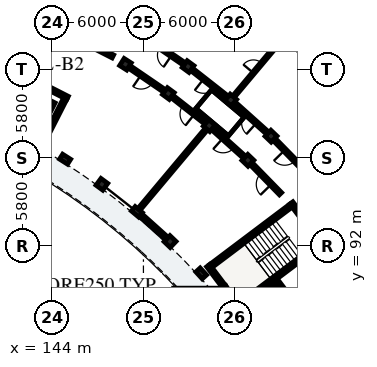
"""IFC4 building model, lengths in metres.
Left out: names, types, materials, properties, quantities, classifications, styles, units other than length and angle.
Written with IfcOpenShell. Run it as: python <this file> out.ifc"""

import sys

from ifc_helpers import new_model, si_unit, direction, frame, frame_2d, origin, origin_2d, place, context, subcontext, project, spatial, rectangle, extrude, element, fill, save


model = new_model("IFC4")
c1 = context("Model", 3, precision=1e-05, world=origin(), true_north=direction((0.0, 1.0)))
c2 = subcontext(c1, "Body", "Model", "MODEL_VIEW")
j1 = project(units=[si_unit("LENGTHUNIT", "METRE"), si_unit("PLANEANGLEUNIT", "RADIAN")], contexts=[c1])
p1 = place(None, origin())
s1 = spatial("IfcSite", under=j1, at=p1, CompositionType="ELEMENT")
p2 = place(p1, origin())
s2 = spatial("IfcBuilding", under=s1, at=p2, CompositionType="ELEMENT")
p3 = place(p2, frame((0.0, 0.0, 15.56)))
s3 = spatial("IfcBuildingStorey", under=s2, at=p3, CompositionType="ELEMENT", Elevation=15.56)
p4 = place(p3, frame((159.707, 94.658, 0.0), z_axis=(0.0, 0.0, 1.0), x_axis=(-0.798639633744, -0.601809550782, 0.0)))
e1 = element("IfcWall", 1, at=p4, inside=s3, PredefinedType="SHEAR", context=c2, shape_type="SweptSolid", body=[
    extrude(rectangle(XDim=6.6, YDim=0.25, at=frame_2d((3.3, 0.0))), origin(), (0.0, 0.0, 1.0), 3.11),
])
p5 = place(p3, frame((154.261, 90.711, 0.0), z_axis=(0.0, 0.0, 1.0), x_axis=(0.601825826579, -0.798627368967, 0.0)))
e2 = element("IfcWall", 2, at=p5, inside=s3, PredefinedType="SHEAR", context=c2, shape_type="SweptSolid", body=[
    extrude(rectangle(XDim=3.42, YDim=0.25, at=frame_2d((1.71, 0.0))), origin(), (0.0, 0.0, 1.0), 3.11),
])
p6 = place(p3, frame((159.731, 94.833, 0.0), z_axis=(0.0, 0.0, 1.0), x_axis=(0.601814606132, -0.798635824294, 0.0)))
e3 = element("IfcWall", 3, at=p6, inside=s3, PredefinedType="SHEAR", context=c2, shape_type="SweptSolid", body=[
    extrude(rectangle(XDim=3.42, YDim=0.25, at=frame_2d((1.71, 0.0))), origin(), (0.0, 0.0, 1.0), 3.11),
])
p7 = place(p3, frame((161.615, 92.126, 0.0), z_axis=(0.0, 0.0, 1.0), x_axis=(-0.798639633744, -0.601809550782, 0.0)))
e4 = element("IfcWall", 4, at=p7, inside=s3, PredefinedType="SHEAR", context=c2, shape_type="SweptSolid", body=[
    extrude(rectangle(XDim=6.6, YDim=0.25, at=frame_2d((3.3, 0.0))), origin(), (0.0, 0.0, 1.0), 3.11),
])
p8 = place(p7, frame((0.22, 0.0, 0.0)))
e5 = element("IfcOpeningElement", 5, at=p8, cuts=e4, PredefinedType="OPENING", context=c2, shape_type="SweptSolid", body=[
    extrude(rectangle(XDim=1.05, YDim=2.15, at=frame_2d((0.525, 1.075))), frame((0.0, 0.135, 0.0), z_axis=(0.0, -1.0, 0.0), x_axis=(1.0, 0.0, 0.0)), (0.0, 0.0, 1.0), 0.27),
])
p9 = place(p3, frame((158.827, 89.619, 0.0), z_axis=(0.0, 0.0, 1.0), x_axis=(0.601819781152, -0.798631924615, 0.0)))
e6 = element("IfcWall", 6, at=p9, inside=s3, PredefinedType="SHEAR", context=c2, shape_type="SweptSolid", body=[
    extrude(rectangle(XDim=3.26, YDim=0.23, at=frame_2d((1.63, 0.0))), origin(), (0.0, 0.0, 1.0), 3.11),
])
p10 = place(p9, frame((0.9, 0.0, 0.0)))
e7 = element("IfcOpeningElement", 7, at=p10, cuts=e6, PredefinedType="OPENING", context=c2, shape_type="SweptSolid", body=[
    extrude(rectangle(XDim=1.1, YDim=2.15, at=frame_2d((0.55, 1.075))), frame((0.0, 0.125, 0.0), z_axis=(0.0, -1.0, 0.0), x_axis=(1.0, 0.0, 0.0)), (0.0, 0.0, 1.0), 0.25),
])
p11 = place(p3, frame((158.805, 89.458, 0.0), z_axis=(0.0, 0.0, 1.0), x_axis=(-0.798608971494, -0.601850239387, 0.0)))
e8 = element("IfcWall", 8, at=p11, inside=s3, PredefinedType="SHEAR", context=c2, shape_type="SweptSolid", body=[
    extrude(rectangle(XDim=2.7, YDim=0.23, at=frame_2d((1.35, 0.0))), origin(), (0.0, 0.0, 1.0), 3.11),
])
p12 = place(p3, frame((142.103, 103.224, 0.0), z_axis=(0.0, 0.0, 1.0), x_axis=(0.891001200497, -0.454000947921, 0.0)))
e9 = element("IfcWall", 9, at=p12, inside=s3, PredefinedType="SHEAR", context=c2, shape_type="SweptSolid", body=[
    extrude(rectangle(XDim=3.26, YDim=0.23, at=frame_2d((1.63, 0.0))), origin(), (0.0, 0.0, 1.0), 3.11),
])
p13 = place(p12, frame((0.9, 0.0, 0.0)))
e10 = element("IfcOpeningElement", 10, at=p13, cuts=e9, PredefinedType="OPENING", context=c2, shape_type="SweptSolid", body=[
    extrude(rectangle(XDim=1.0, YDim=2.15, at=frame_2d((0.5, 1.075))), frame((0.0, 0.125, 0.0), z_axis=(0.0, -1.0, 0.0), x_axis=(1.0, 0.0, 0.0)), (0.0, 0.0, 1.0), 0.25),
])
p14 = place(p3, frame((144.853, 101.694, 0.0), z_axis=(0.0, 0.0, 1.0), x_axis=(-0.454036857101, -0.890982902414, 0.0)))
e11 = element("IfcWall", 11, at=p14, inside=s3, PredefinedType="SHEAR", context=c2, shape_type="SweptSolid", body=[
    extrude(rectangle(XDim=2.7, YDim=0.23, at=frame_2d((1.35, 0.0))), origin(), (0.0, 0.0, 1.0), 3.11),
])
p15 = place(p3, frame((153.801, 90.198, 0.0), z_axis=(0.0, 0.0, 1.0), x_axis=(0.73793204255, 0.674875025896, 0.0)))
e12 = element("IfcColumn", 12, at=p15, inside=s3, PredefinedType="PILASTER", context=c2, shape_type="SweptSolid", body=[
    extrude(rectangle(XDim=0.38, YDim=0.62, at=origin_2d()), origin(), (0.0, 0.0, 1.0), 3.11),
])
for number, where, z_axis, x_axis in (
    (13, (151.753, 92.294, 0.0), (0.0, 0.0, 1.0), (0.692, 0.722, 0.0)),
    (14, (156.873, 97.637, 0.0), (0.0, 0.0, 1.0), (0.692, 0.722, 0.0)),
    (15, (158.395, 99.226, 0.0), (0.0, 0.0, 1.0), (0.692, 0.722, 0.0)),
):
    element("IfcColumn", number, at=place(p3, frame(where, z_axis=z_axis, x_axis=x_axis)), inside=s3, PredefinedType="COLUMN", context=c2, shape_type="SweptSolid", body=[
        extrude(rectangle(XDim=0.55, YDim=0.55, at=origin_2d()), origin(), (0.0, 0.0, 1.0), 3.11),
    ])
p16 = place(p3, frame((149.572, 94.251, 0.0), z_axis=(0.0, 0.0, 1.0), x_axis=(0.642787582947, 0.766044465556, 0.0)))
e16 = element("IfcColumn", 16, at=p16, inside=s3, PredefinedType="PILASTER", context=c2, shape_type="SweptSolid", body=[
    extrude(rectangle(XDim=0.38, YDim=0.62, at=origin_2d()), origin(), (0.0, 0.0, 1.0), 3.11),
])
for number, where, z_axis, x_axis in (
    (17, (154.329, 99.919, 0.0), (0.0, 0.0, 1.0), (0.643, 0.766, 0.0)),
    (18, (155.743, 101.605, 0.0), (0.0, 0.0, 1.0), (0.643, 0.766, 0.0)),
    (19, (147.266, 96.059, 0.0), (0.0, 0.0, 1.0), (0.591, 0.807, 0.0)),
    (20, (151.639, 102.029, 0.0), (0.0, 0.0, 1.0), (0.591, 0.807, 0.0)),
    (21, (152.939, 103.804, 0.0), (0.0, 0.0, 1.0), (0.591, 0.807, 0.0)),
):
    element("IfcColumn", number, at=place(p3, frame(where, z_axis=z_axis, x_axis=x_axis)), inside=s3, PredefinedType="COLUMN", context=c2, shape_type="SweptSolid", body=[
        extrude(rectangle(XDim=0.55, YDim=0.55, at=origin_2d()), origin(), (0.0, 0.0, 1.0), 3.11),
    ])
p17 = place(p3, frame((144.847, 97.712, 0.0), z_axis=(0.0, 0.0, 1.0), x_axis=(0.536481544469, 0.843912052553, 0.0)))
e22 = element("IfcColumn", 22, at=p17, inside=s3, PredefinedType="PILASTER", context=c2, shape_type="SweptSolid", body=[
    extrude(rectangle(XDim=0.38, YDim=0.62, at=origin_2d()), origin(), (0.0, 0.0, 1.0), 3.11),
])
p18 = place(p3, frame((148.817, 103.957, 0.0), z_axis=(0.0, 0.0, 1.0), x_axis=(0.536481544469, 0.843912052553, 0.0)))
e23 = element("IfcColumn", 23, at=p18, inside=s3, PredefinedType="COLUMN", context=c2, shape_type="SweptSolid", body=[
    extrude(rectangle(XDim=0.55, YDim=0.55, at=origin_2d()), origin(), (0.0, 0.0, 1.0), 3.11),
])
p19 = place(p3, frame((162.018, 103.36, 0.0), z_axis=(0.0, 0.0, 1.0), x_axis=(-0.744413726571, 0.667718656092, 0.0)))
e24 = element("IfcWall", 24, at=p19, inside=s3, PredefinedType="SOLIDWALL", context=c2, shape_type="SweptSolid", body=[
    extrude(rectangle(XDim=3.521, YDim=0.24, at=frame_2d((1.76, 0.0))), origin(), (0.0, 0.0, 1.0), 2.355),
])
p20 = place(p19, frame((0.92, 0.0, 0.55)))
e25 = element("IfcOpeningElement", 25, at=p20, cuts=e24, PredefinedType="OPENING", context=c2, shape_type="SweptSolid", body=[
    extrude(rectangle(XDim=1.68, YDim=1.585, at=frame_2d((0.84, 0.792))), frame((0.0, 0.13, 0.0), z_axis=(0.0, -1.0, 0.0), x_axis=(1.0, 0.0, 0.0)), (0.0, 0.0, 1.0), 0.26),
])
p21 = place(p3, frame((151.571, 92.458, 0.0), z_axis=(0.0, 0.0, 1.0), x_axis=(-0.744489903584, 0.667633719536, 0.0)))
e26 = element("IfcWall", 26, at=p21, inside=s3, PredefinedType="SOLIDWALL", context=c2, shape_type="SweptSolid", body=[
    extrude(rectangle(XDim=2.525, YDim=0.24, at=frame_2d((1.263, 0.0))), origin(), (0.0, 0.0, 1.0), 2.355),
])
p22 = place(p21, frame((0.588, 0.0, 0.35)))
e27 = element("IfcOpeningElement", 27, at=p22, cuts=e26, PredefinedType="OPENING", context=c2, shape_type="SweptSolid", body=[
    extrude(rectangle(XDim=1.35, YDim=1.65, at=frame_2d((0.675, 0.825))), frame((0.0, 0.13, 0.0), z_axis=(0.0, -1.0, 0.0), x_axis=(1.0, 0.0, 0.0)), (0.0, 0.0, 1.0), 0.26),
])
p23 = place(p3, frame((143.625, 106.696, 0.0), z_axis=(0.0, 0.0, 1.0), x_axis=(0.891003372311, -0.453996685595, 0.0)))
e28 = element("IfcWall", 28, at=p23, inside=s3, PredefinedType="PARTITIONING", context=c2, shape_type="SweptSolid", body=[
    extrude(rectangle(XDim=4.9, YDim=0.22, at=frame_2d((2.45, 0.0))), origin(), (0.0, 0.0, 1.0), 2.34),
])
p24 = place(p23, frame((1.95, 0.0, 0.0)))
e29 = element("IfcOpeningElement", 29, at=p24, cuts=e28, PredefinedType="OPENING", context=c2, shape_type="SweptSolid", body=[
    extrude(rectangle(XDim=0.98, YDim=2.14, at=frame_2d((0.49, 1.07))), frame((0.0, 0.12, 0.0), z_axis=(0.0, -1.0, 0.0), x_axis=(1.0, 0.0, 0.0)), (0.0, 0.0, 1.0), 0.24),
])
p25 = place(p3, frame((160.641, 96.927, 0.0), z_axis=(0.0, 0.0, 1.0), x_axis=(-0.698787219683, 0.715329589496, 0.0)))
e30 = element("IfcWall", 30, at=p25, inside=s3, PredefinedType="PARTITIONING", context=c2, shape_type="SweptSolid", body=[
    extrude(rectangle(XDim=2.863, YDim=0.205, at=frame_2d((1.432, 0.0))), origin(), (0.0, 0.0, 1.0), 2.37),
])
p26 = place(p25, frame((0.937, 0.0, 0.0)))
e31 = element("IfcOpeningElement", 31, at=p26, cuts=e30, PredefinedType="OPENING", context=c2, shape_type="SweptSolid", body=[
    extrude(rectangle(XDim=0.99, YDim=2.16, at=frame_2d((0.495, 1.08))), frame((0.0, 0.113, 0.0), z_axis=(0.0, -1.0, 0.0), x_axis=(1.0, 0.0, 0.0)), (0.0, 0.0, 1.0), 0.225),
])
p27 = place(p3, frame((159.017, 95.443, 0.0), z_axis=(0.0, 0.0, 1.0), x_axis=(-0.698840007829, 0.715278018296, 0.0)))
e32 = element("IfcWall", 32, at=p27, inside=s3, PredefinedType="PARTITIONING", context=c2, shape_type="SweptSolid", body=[
    extrude(rectangle(XDim=2.718, YDim=0.205, at=frame_2d((1.359, 0.0))), origin(), (0.0, 0.0, 1.0), 2.37),
])
p28 = place(p27, frame((0.864, 0.0, 0.0)))
e33 = element("IfcOpeningElement", 33, at=p28, cuts=e32, PredefinedType="OPENING", context=c2, shape_type="SweptSolid", body=[
    extrude(rectangle(XDim=0.99, YDim=2.16, at=frame_2d((0.495, 1.08))), frame((0.0, 0.113, 0.0), z_axis=(0.0, -1.0, 0.0), x_axis=(1.0, 0.0, 0.0)), (0.0, 0.0, 1.0), 0.225),
])
p29 = place(p3, frame((158.135, 99.459, 0.0), z_axis=(0.0, 0.0, 1.0), x_axis=(-0.744433521088, 0.667696587291, 0.0)))
e34 = element("IfcWall", 34, at=p29, inside=s3, PredefinedType="PARTITIONING", context=c2, shape_type="SweptSolid", body=[
    extrude(rectangle(XDim=2.863, YDim=0.205, at=frame_2d((1.432, 0.0))), origin(), (0.0, 0.0, 1.0), 2.37),
])
p30 = place(p29, frame((0.947, 0.0, 0.0)))
e35 = element("IfcOpeningElement", 35, at=p30, cuts=e34, PredefinedType="OPENING", context=c2, shape_type="SweptSolid", body=[
    extrude(rectangle(XDim=0.97, YDim=2.15, at=frame_2d((0.485, 1.075))), frame((0.0, 0.113, 0.0), z_axis=(0.0, -1.0, 0.0), x_axis=(1.0, 0.0, 0.0)), (0.0, 0.0, 1.0), 0.225),
])
p31 = place(p3, frame((156.613, 97.871, 0.0), z_axis=(0.0, 0.0, 1.0), x_axis=(-0.744418559135, 0.667713268413, 0.0)))
e36 = element("IfcWall", 36, at=p31, inside=s3, PredefinedType="PARTITIONING", context=c2, shape_type="SweptSolid", body=[
    extrude(rectangle(XDim=2.718, YDim=0.205, at=frame_2d((1.359, 0.0))), origin(), (0.0, 0.0, 1.0), 2.37),
])
p32 = place(p31, frame((0.874, 0.0, 0.0)))
e37 = element("IfcOpeningElement", 37, at=p32, cuts=e36, PredefinedType="OPENING", context=c2, shape_type="SweptSolid", body=[
    extrude(rectangle(XDim=0.97, YDim=2.15, at=frame_2d((0.485, 1.075))), frame((0.0, 0.113, 0.0), z_axis=(0.0, -1.0, 0.0), x_axis=(1.0, 0.0, 0.0)), (0.0, 0.0, 1.0), 0.225),
])
p33 = place(p3, frame((156.0, 101.911, 0.0), z_axis=(0.0, 0.0, 1.0), x_axis=(0.642811926223, 0.766024038465, 0.0)))
e38 = element("IfcWall", 38, at=p33, inside=s3, PredefinedType="PLUMBINGWALL", context=c2, shape_type="SweptSolid", body=[
    extrude(rectangle(XDim=4.7, YDim=0.15, at=frame_2d((2.35, 0.0))), origin(), (0.0, 0.0, 1.0), 2.37),
])
p34 = place(p33, frame((1.92, 0.0, 0.0)))
e39 = element("IfcOpeningElement", 39, at=p34, cuts=e38, PredefinedType="OPENING", context=c2, shape_type="SweptSolid", body=[
    extrude(rectangle(XDim=0.86, YDim=2.06, at=frame_2d((0.43, 1.03))), frame((0.0, 0.085, 0.0), z_axis=(0.0, -1.0, 0.0), x_axis=(1.0, 0.0, 0.0)), (0.0, 0.0, 1.0), 0.17),
])
p35 = place(p3, frame((149.829, 94.557, 0.0), z_axis=(0.0, 0.0, 1.0), x_axis=(0.642789470807, 0.766042881449, 0.0)))
e40 = element("IfcWall", 40, at=p35, inside=s3, PredefinedType="PARTITIONING", context=c2, shape_type="SweptSolid", body=[
    extrude(rectangle(XDim=6.6, YDim=0.185, at=frame_2d((3.3, 0.0))), origin(), (0.0, 0.0, 1.0), 2.37),
])
p36 = place(p3, frame((155.467, 101.821, 0.0), z_axis=(0.0, 0.0, 1.0), x_axis=(-0.786806323554, 0.617199975061, 0.0)))
e41 = element("IfcWall", 41, at=p36, inside=s3, PredefinedType="PARTITIONING", context=c2, shape_type="SweptSolid", body=[
    extrude(rectangle(XDim=2.863, YDim=0.205, at=frame_2d((1.432, 0.0))), origin(), (0.0, 0.0, 1.0), 2.37),
])
p37 = place(p36, frame((0.957, 0.0, 0.0)))
e42 = element("IfcOpeningElement", 42, at=p37, cuts=e41, PredefinedType="OPENING", context=c2, shape_type="SweptSolid", body=[
    extrude(rectangle(XDim=0.95, YDim=2.13, at=frame_2d((0.475, 1.065))), frame((0.0, 0.113, 0.0), z_axis=(0.0, -1.0, 0.0), x_axis=(1.0, 0.0, 0.0)), (0.0, 0.0, 1.0), 0.225),
])
p38 = place(p3, frame((154.053, 100.135, 0.0), z_axis=(0.0, 0.0, 1.0), x_axis=(-0.786835457019, 0.617162833924, 0.0)))
e43 = element("IfcWall", 43, at=p38, inside=s3, PredefinedType="PARTITIONING", context=c2, shape_type="SweptSolid", body=[
    extrude(rectangle(XDim=2.718, YDim=0.205, at=frame_2d((1.359, 0.0))), origin(), (0.0, 0.0, 1.0), 2.37),
])
p39 = place(p38, frame((0.884, 0.0, 0.0)))
e44 = element("IfcOpeningElement", 44, at=p39, cuts=e43, PredefinedType="OPENING", context=c2, shape_type="SweptSolid", body=[
    extrude(rectangle(XDim=0.95, YDim=2.13, at=frame_2d((0.475, 1.065))), frame((0.0, 0.113, 0.0), z_axis=(0.0, -1.0, 0.0), x_axis=(1.0, 0.0, 0.0)), (0.0, 0.0, 1.0), 0.225),
])
p40 = place(p3, frame((152.65, 104.001, 0.0), z_axis=(0.0, 0.0, 1.0), x_axis=(-0.825779671787, 0.563992848947, 0.0)))
e45 = element("IfcWall", 45, at=p40, inside=s3, PredefinedType="PARTITIONING", context=c2, shape_type="SweptSolid", body=[
    extrude(rectangle(XDim=2.863, YDim=0.205, at=frame_2d((1.432, 0.0))), origin(), (0.0, 0.0, 1.0), 2.37),
])
p41 = place(p40, frame((0.967, 0.0, 0.0)))
e46 = element("IfcOpeningElement", 46, at=p41, cuts=e45, PredefinedType="OPENING", context=c2, shape_type="SweptSolid", body=[
    extrude(rectangle(XDim=0.93, YDim=2.12, at=frame_2d((0.465, 1.06))), frame((0.0, 0.113, 0.0), z_axis=(0.0, -1.0, 0.0), x_axis=(1.0, 0.0, 0.0)), (0.0, 0.0, 1.0), 0.225),
])
p42 = place(p3, frame((151.35, 102.226, 0.0), z_axis=(0.0, 0.0, 1.0), x_axis=(-0.825752009056, 0.56403334967, 0.0)))
e47 = element("IfcWall", 47, at=p42, inside=s3, PredefinedType="PARTITIONING", context=c2, shape_type="SweptSolid", body=[
    extrude(rectangle(XDim=2.718, YDim=0.205, at=frame_2d((1.359, 0.0))), origin(), (0.0, 0.0, 1.0), 2.37),
])
p43 = place(p42, frame((0.894, 0.0, 0.0)))
e48 = element("IfcOpeningElement", 48, at=p43, cuts=e47, PredefinedType="OPENING", context=c2, shape_type="SweptSolid", body=[
    extrude(rectangle(XDim=0.93, YDim=2.12, at=frame_2d((0.465, 1.06))), frame((0.0, 0.113, 0.0), z_axis=(0.0, -1.0, 0.0), x_axis=(1.0, 0.0, 0.0)), (0.0, 0.0, 1.0), 0.225),
])
p44 = place(p20, origin())
e49 = element("IfcWindow", 49, at=p44, inside=s3, PartitioningType="SINGLE_PANEL", PredefinedType="WINDOW", context=c2, shape_type="SweptSolid", body=[
    extrude(rectangle(XDim=1.68, YDim=1.585, at=frame_2d((0.84, 0.792))), frame((0.0, 0.03, 0.0), z_axis=(0.0, -1.0, 0.0), x_axis=(1.0, 0.0, 0.0)), (0.0, 0.0, 1.0), 0.06),
])
fill(e25, e49)
p45 = place(p22, origin())
e50 = element("IfcWindow", 50, at=p45, inside=s3, PartitioningType="SINGLE_PANEL", PredefinedType="WINDOW", context=c2, shape_type="SweptSolid", body=[
    extrude(rectangle(XDim=1.35, YDim=1.65, at=frame_2d((0.675, 0.825))), frame((0.0, 0.03, 0.0), z_axis=(0.0, -1.0, 0.0), x_axis=(1.0, 0.0, 0.0)), (0.0, 0.0, 1.0), 0.06),
])
fill(e27, e50)
p46 = place(p26, origin())
e51 = element("IfcDoor", 51, at=p46, inside=s3, OperationType="SINGLE_SWING_RIGHT", PredefinedType="DOOR", context=c2, shape_type="SweptSolid", body=[
    extrude(rectangle(XDim=0.99, YDim=2.16, at=frame_2d((0.495, 1.08))), frame((0.0, 0.025, 0.0), z_axis=(0.0, -1.0, 0.0), x_axis=(1.0, 0.0, 0.0)), (0.0, 0.0, 1.0), 0.05),
])
fill(e31, e51)
p47 = place(p28, origin())
e52 = element("IfcDoor", 52, at=p47, inside=s3, OperationType="SINGLE_SWING_LEFT", PredefinedType="DOOR", context=c2, shape_type="SweptSolid", body=[
    extrude(rectangle(XDim=0.99, YDim=2.16, at=frame_2d((0.495, 1.08))), frame((0.0, 0.025, 0.0), z_axis=(0.0, -1.0, 0.0), x_axis=(1.0, 0.0, 0.0)), (0.0, 0.0, 1.0), 0.05),
])
fill(e33, e52)
p48 = place(p30, origin())
e53 = element("IfcDoor", 53, at=p48, inside=s3, OperationType="SINGLE_SWING_LEFT", PredefinedType="DOOR", context=c2, shape_type="SweptSolid", body=[
    extrude(rectangle(XDim=0.97, YDim=2.15, at=frame_2d((0.485, 1.075))), frame((0.0, 0.025, 0.0), z_axis=(0.0, -1.0, 0.0), x_axis=(1.0, 0.0, 0.0)), (0.0, 0.0, 1.0), 0.05),
])
fill(e35, e53)
p49 = place(p32, origin())
e54 = element("IfcDoor", 54, at=p49, inside=s3, OperationType="SINGLE_SWING_RIGHT", PredefinedType="DOOR", context=c2, shape_type="SweptSolid", body=[
    extrude(rectangle(XDim=0.97, YDim=2.15, at=frame_2d((0.485, 1.075))), frame((0.0, 0.025, 0.0), z_axis=(0.0, -1.0, 0.0), x_axis=(1.0, 0.0, 0.0)), (0.0, 0.0, 1.0), 0.05),
])
fill(e37, e54)
p50 = place(p34, origin())
e55 = element("IfcDoor", 55, at=p50, inside=s3, OperationType="SINGLE_SWING_LEFT", PredefinedType="DOOR", context=c2, shape_type="SweptSolid", body=[
    extrude(rectangle(XDim=0.86, YDim=2.06, at=frame_2d((0.43, 1.03))), frame((0.0, 0.025, 0.0), z_axis=(0.0, -1.0, 0.0), x_axis=(1.0, 0.0, 0.0)), (0.0, 0.0, 1.0), 0.05),
])
fill(e39, e55)
p51 = place(p37, origin())
e56 = element("IfcDoor", 56, at=p51, inside=s3, OperationType="SINGLE_SWING_RIGHT", PredefinedType="DOOR", context=c2, shape_type="SweptSolid", body=[
    extrude(rectangle(XDim=0.95, YDim=2.13, at=frame_2d((0.475, 1.065))), frame((0.0, 0.025, 0.0), z_axis=(0.0, -1.0, 0.0), x_axis=(1.0, 0.0, 0.0)), (0.0, 0.0, 1.0), 0.05),
])
fill(e42, e56)
p52 = place(p39, origin())
e57 = element("IfcDoor", 57, at=p52, inside=s3, OperationType="SINGLE_SWING_LEFT", PredefinedType="DOOR", context=c2, shape_type="SweptSolid", body=[
    extrude(rectangle(XDim=0.95, YDim=2.13, at=frame_2d((0.475, 1.065))), frame((0.0, 0.025, 0.0), z_axis=(0.0, -1.0, 0.0), x_axis=(1.0, 0.0, 0.0)), (0.0, 0.0, 1.0), 0.05),
])
fill(e44, e57)
p53 = place(p41, origin())
e58 = element("IfcDoor", 58, at=p53, inside=s3, OperationType="SINGLE_SWING_LEFT", PredefinedType="DOOR", context=c2, shape_type="SweptSolid", body=[
    extrude(rectangle(XDim=0.93, YDim=2.12, at=frame_2d((0.465, 1.06))), frame((0.0, 0.025, 0.0), z_axis=(0.0, -1.0, 0.0), x_axis=(1.0, 0.0, 0.0)), (0.0, 0.0, 1.0), 0.05),
])
fill(e46, e58)
p54 = place(p43, origin())
e59 = element("IfcDoor", 59, at=p54, inside=s3, OperationType="SINGLE_SWING_RIGHT", PredefinedType="DOOR", context=c2, shape_type="SweptSolid", body=[
    extrude(rectangle(XDim=0.93, YDim=2.12, at=frame_2d((0.465, 1.06))), frame((0.0, 0.025, 0.0), z_axis=(0.0, -1.0, 0.0), x_axis=(1.0, 0.0, 0.0)), (0.0, 0.0, 1.0), 0.05),
])
fill(e48, e59)
save(model, sys.argv[1])
